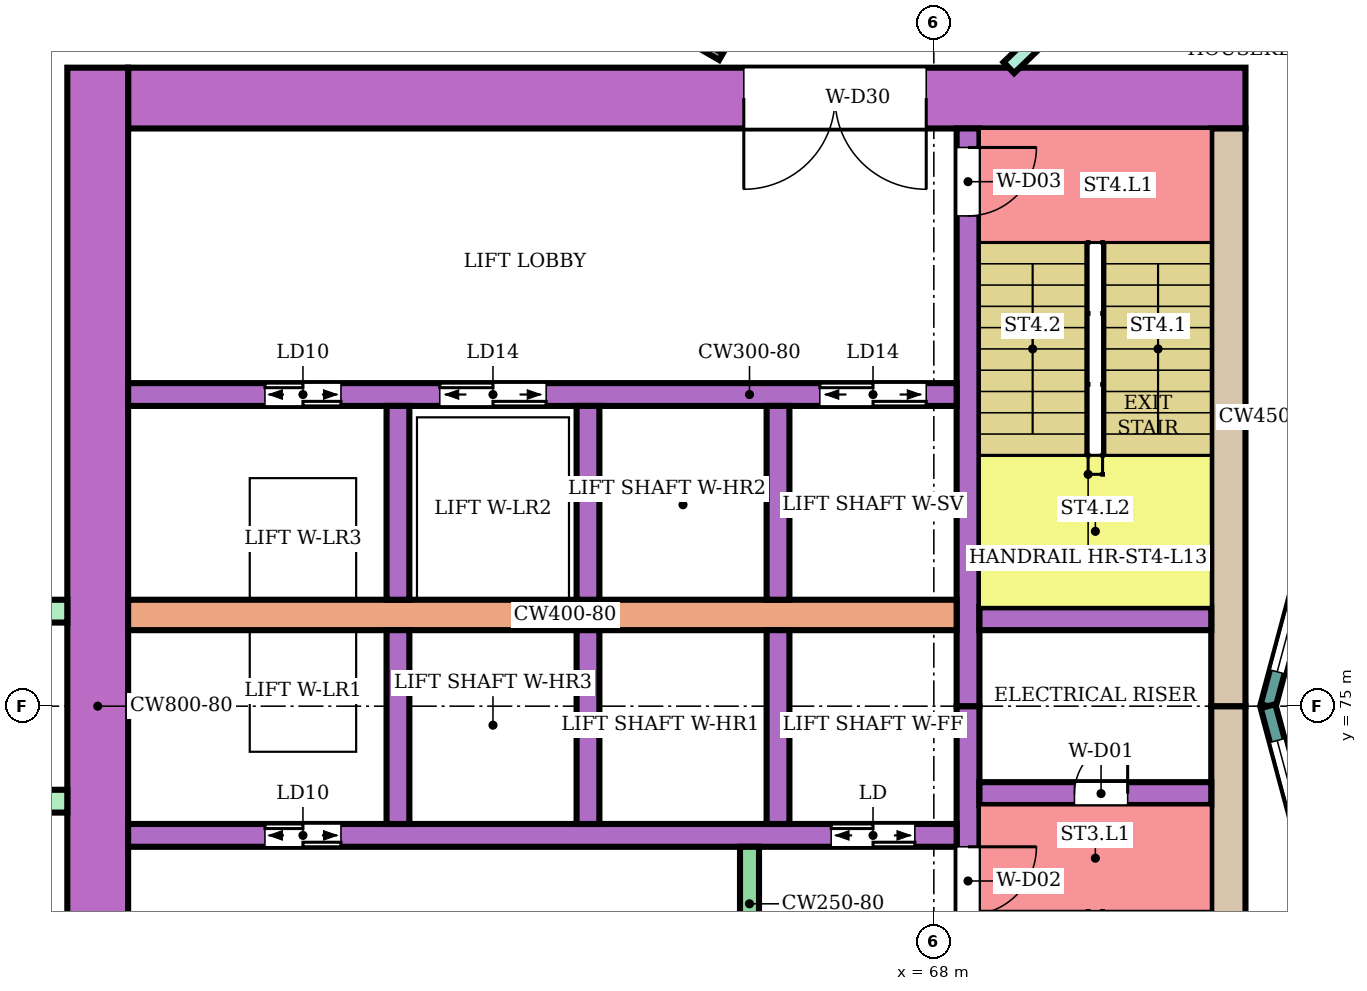
"""IFC4 building model, lengths in metres.
Left out: names, types, materials, properties, quantities, classifications, styles, units other than length and angle.
Written with IfcOpenShell. Run it as: python <this file> out.ifc"""

import sys

from ifc_helpers import new_model, si_unit, direction, frame, frame_2d, origin, place, context, subcontext, project, spatial, rectangle, extrude, element, fill, save


model = new_model("IFC4")
c1 = context("Model", 3, precision=1e-05, world=origin(), true_north=direction((0.0, 1.0)))
c2 = subcontext(c1, "Body", "Model", "MODEL_VIEW")
j1 = project(units=[si_unit("LENGTHUNIT", "METRE"), si_unit("PLANEANGLEUNIT", "RADIAN")], contexts=[c1])
p1 = place(None, origin())
s1 = spatial("IfcSite", under=j1, at=p1, CompositionType="ELEMENT")
p2 = place(p1, origin())
s2 = spatial("IfcBuilding", under=s1, at=p2, CompositionType="ELEMENT")
p3 = place(p2, frame((0.0, 0.0, 59.2)))
s3 = spatial("IfcBuildingStorey", under=s2, at=p3, CompositionType="ELEMENT", Elevation=59.2)
p4 = place(p3, frame((72.1, 83.0, 0.0), z_axis=(0.0, 0.0, 1.0), x_axis=(-1.0, 0.0, 0.0)))
e1 = element("IfcWall", 1, at=p4, inside=s3, PredefinedType="SHEAR", context=c2, shape_type="SweptSolid", body=[
    extrude(rectangle(XDim=14.7, YDim=0.8, at=frame_2d((7.35, 0.0))), origin(), (0.0, 0.0, 1.0), 3.48),
])
p5 = place(p4, frame((4.2, 0.0, 0.0)))
e2 = element("IfcOpeningElement", 2, at=p5, cuts=e1, PredefinedType="OPENING", context=c2, shape_type="SweptSolid", body=[
    extrude(rectangle(XDim=2.4, YDim=2.4, at=frame_2d((1.2, 1.2))), frame((0.0, 0.41, 0.0), z_axis=(0.0, -1.0, 0.0), x_axis=(1.0, 0.0, 0.0)), (0.0, 0.0, 1.0), 0.82),
])
for number, where, z_axis, x_axis in (
    (3, (71.875, 75.0, 0.0), (0.0, 0.0, 1.0), (0.0, -1.0, 0.0)),
    (4, (71.875, 82.6, 0.0), (0.0, 0.0, 1.0), (0.0, -1.0, 0.0)),
):
    element("IfcWall", number, at=place(p3, frame(where, z_axis=z_axis, x_axis=x_axis)), inside=s3, PredefinedType="SHEAR", context=c2, shape_type="SweptSolid", body=[
        extrude(rectangle(XDim=7.6, YDim=0.45, at=frame_2d((3.8, 0.0))), origin(), (0.0, 0.0, 1.0), 3.48),
    ])
p6 = place(p3, frame((57.0, 83.4, 0.0), z_axis=(0.0, 0.0, 1.0), x_axis=(0.0, -1.0, 0.0)))
e5 = element("IfcWall", 5, at=p6, inside=s3, PredefinedType="SHEAR", context=c2, shape_type="SweptSolid", body=[
    extrude(rectangle(XDim=16.8, YDim=0.8, at=frame_2d((8.4, 0.0))), origin(), (0.0, 0.0, 1.0), 3.48),
])
p7 = place(p3, frame((68.45, 75.0, 0.0), z_axis=(0.0, 0.0, 1.0), x_axis=(0.0, -1.0, 0.0)))
e6 = element("IfcWall", 6, at=p7, inside=s3, PredefinedType="SHEAR", context=c2, shape_type="SweptSolid", body=[
    extrude(rectangle(XDim=7.6, YDim=0.3, at=frame_2d((3.8, 0.0))), origin(), (0.0, 0.0, 1.0), 3.48),
])
p8 = place(p7, frame((1.85, 0.0, 0.0)))
e7 = element("IfcOpeningElement", 7, at=p8, cuts=e6, PredefinedType="OPENING", context=c2, shape_type="SweptSolid", body=[
    extrude(rectangle(XDim=0.9, YDim=2.1, at=frame_2d((0.45, 1.05))), frame((0.0, 0.16, 0.0), z_axis=(0.0, -1.0, 0.0), x_axis=(1.0, 0.0, 0.0)), (0.0, 0.0, 1.0), 0.32),
])
p9 = place(p3, frame((68.45, 82.6, 0.0), z_axis=(0.0, 0.0, 1.0), x_axis=(0.0, -1.0, 0.0)))
e8 = element("IfcWall", 8, at=p9, inside=s3, PredefinedType="SHEAR", context=c2, shape_type="SweptSolid", body=[
    extrude(rectangle(XDim=7.6, YDim=0.3, at=frame_2d((3.8, 0.0))), origin(), (0.0, 0.0, 1.0), 3.48),
])
p10 = place(p9, frame((0.25, 0.0, 0.0)))
e9 = element("IfcOpeningElement", 9, at=p10, cuts=e8, PredefinedType="OPENING", context=c2, shape_type="SweptSolid", body=[
    extrude(rectangle(XDim=0.9, YDim=2.1, at=frame_2d((0.45, 1.05))), frame((0.0, 0.16, 0.0), z_axis=(0.0, -1.0, 0.0), x_axis=(1.0, 0.0, 0.0)), (0.0, 0.0, 1.0), 0.32),
])
p11 = place(p3, frame((71.65, 73.85, 0.0), z_axis=(0.0, 0.0, 1.0), x_axis=(-1.0, 0.0, 0.0)))
e10 = element("IfcWall", 10, at=p11, inside=s3, PredefinedType="SHEAR", context=c2, shape_type="SweptSolid", body=[
    extrude(rectangle(XDim=3.05, YDim=0.3, at=frame_2d((1.525, 0.0))), origin(), (0.0, 0.0, 1.0), 3.48),
])
p12 = place(p11, frame((1.1, 0.0, 0.0)))
e11 = element("IfcOpeningElement", 11, at=p12, cuts=e10, PredefinedType="OPENING", context=c2, shape_type="SweptSolid", body=[
    extrude(rectangle(XDim=0.7, YDim=2.0, at=frame_2d((0.35, 1.0))), frame((0.0, 0.16, 0.0), z_axis=(0.0, -1.0, 0.0), x_axis=(1.0, 0.0, 0.0)), (0.0, 0.0, 1.0), 0.32),
])
p13 = place(p3, frame((71.65, 76.15, 0.0), z_axis=(0.0, 0.0, 1.0), x_axis=(-1.0, 0.0, 0.0)))
e12 = element("IfcWall", 12, at=p13, inside=s3, PredefinedType="SHEAR", context=c2, shape_type="SweptSolid", body=[
    extrude(rectangle(XDim=3.05, YDim=0.3, at=frame_2d((1.525, 0.0))), origin(), (0.0, 0.0, 1.0), 3.48),
])
p14 = place(p3, frame((68.3, 73.3, 0.0), z_axis=(0.0, 0.0, 1.0), x_axis=(-1.0, 0.0, 0.0)))
e13 = element("IfcWall", 13, at=p14, inside=s3, PredefinedType="SHEAR", context=c2, shape_type="SweptSolid", body=[
    extrude(rectangle(XDim=10.9, YDim=0.3, at=frame_2d((5.45, 0.0))), origin(), (0.0, 0.0, 1.0), 3.48),
])
p15 = place(p14, frame((0.55, 0.0, 0.0)))
e14 = element("IfcOpeningElement", 14, at=p15, cuts=e13, PredefinedType="OPENING", context=c2, shape_type="SweptSolid", body=[
    extrude(rectangle(XDim=1.1, YDim=2.1, at=frame_2d((0.55, 1.05))), frame((0.0, 0.16, 0.0), z_axis=(0.0, -1.0, 0.0), x_axis=(1.0, 0.0, 0.0)), (0.0, 0.0, 1.0), 0.32),
])
p16 = place(p14, frame((8.1, 0.0, 0.0)))
e15 = element("IfcOpeningElement", 15, at=p16, cuts=e13, PredefinedType="OPENING", context=c2, shape_type="SweptSolid", body=[
    extrude(rectangle(XDim=1.0, YDim=2.1, at=frame_2d((0.5, 1.05))), frame((0.0, 0.16, 0.0), z_axis=(0.0, -1.0, 0.0), x_axis=(1.0, 0.0, 0.0)), (0.0, 0.0, 1.0), 0.32),
])
p17 = place(p3, frame((68.3, 76.2, 0.0), z_axis=(0.0, 0.0, 1.0), x_axis=(-1.0, 0.0, 0.0)))
e16 = element("IfcWall", 16, at=p17, inside=s3, PredefinedType="SHEAR", context=c2, shape_type="SweptSolid", body=[
    extrude(rectangle(XDim=10.9, YDim=0.4, at=frame_2d((5.45, 0.0))), origin(), (0.0, 0.0, 1.0), 3.48),
])
p18 = place(p3, frame((68.3, 79.1, 0.0), z_axis=(0.0, 0.0, 1.0), x_axis=(-1.0, 0.0, 0.0)))
e17 = element("IfcWall", 17, at=p18, inside=s3, PredefinedType="SHEAR", context=c2, shape_type="SweptSolid", body=[
    extrude(rectangle(XDim=10.9, YDim=0.3, at=frame_2d((5.45, 0.0))), origin(), (0.0, 0.0, 1.0), 3.48),
])
p19 = place(p18, frame((0.4, 0.0, 0.0)))
e18 = element("IfcOpeningElement", 18, at=p19, cuts=e17, PredefinedType="OPENING", context=c2, shape_type="SweptSolid", body=[
    extrude(rectangle(XDim=1.4, YDim=2.1, at=frame_2d((0.7, 1.05))), frame((0.0, 0.16, 0.0), z_axis=(0.0, -1.0, 0.0), x_axis=(1.0, 0.0, 0.0)), (0.0, 0.0, 1.0), 0.32),
])
p20 = place(p18, frame((5.4, 0.0, 0.0)))
e19 = element("IfcOpeningElement", 19, at=p20, cuts=e17, PredefinedType="OPENING", context=c2, shape_type="SweptSolid", body=[
    extrude(rectangle(XDim=1.4, YDim=2.1, at=frame_2d((0.7, 1.05))), frame((0.0, 0.16, 0.0), z_axis=(0.0, -1.0, 0.0), x_axis=(1.0, 0.0, 0.0)), (0.0, 0.0, 1.0), 0.32),
])
p21 = place(p18, frame((8.1, 0.0, 0.0)))
e20 = element("IfcOpeningElement", 20, at=p21, cuts=e17, PredefinedType="OPENING", context=c2, shape_type="SweptSolid", body=[
    extrude(rectangle(XDim=1.0, YDim=2.1, at=frame_2d((0.5, 1.05))), frame((0.0, 0.16, 0.0), z_axis=(0.0, -1.0, 0.0), x_axis=(1.0, 0.0, 0.0)), (0.0, 0.0, 1.0), 0.32),
])
for number, where, z_axis, x_axis in (
    (21, (65.95, 76.0, 0.0), (0.0, 0.0, 1.0), (0.0, -1.0, 0.0)),
    (22, (63.45, 76.0, 0.0), (0.0, 0.0, 1.0), (0.0, -1.0, 0.0)),
    (23, (60.95, 76.0, 0.0), (0.0, 0.0, 1.0), (0.0, -1.0, 0.0)),
    (24, (65.95, 78.95, 0.0), (0.0, 0.0, 1.0), (0.0, -1.0, 0.0)),
    (25, (63.45, 78.95, 0.0), (0.0, 0.0, 1.0), (0.0, -1.0, 0.0)),
    (26, (60.95, 78.95, 0.0), (0.0, 0.0, 1.0), (0.0, -1.0, 0.0)),
):
    element("IfcWall", number, at=place(p3, frame(where, z_axis=z_axis, x_axis=x_axis)), inside=s3, PredefinedType="SHEAR", context=c2, shape_type="SweptSolid", body=[
        extrude(rectangle(XDim=2.55, YDim=0.3, at=frame_2d((1.275, 0.0))), origin(), (0.0, 0.0, 1.0), 3.48),
    ])
p22 = place(p3, frame((65.575, 73.15, 0.0), z_axis=(0.0, 0.0, 1.0), x_axis=(0.0, -1.0, 0.0)))
e27 = element("IfcWall", 27, at=p22, inside=s3, PredefinedType="SHEAR", context=c2, shape_type="SweptSolid", body=[
    extrude(rectangle(XDim=1.5, YDim=0.25, at=frame_2d((0.75, 0.0))), origin(), (0.0, 0.0, 1.0), 3.48),
])
for number, where, z_axis, x_axis in (
    (28, (56.6, 76.25, 0.0), (0.0, 0.0, 1.0), (-1.0, 0.0, 0.0)),
    (29, (56.6, 73.75, 0.0), (0.0, 0.0, 1.0), (-1.0, 0.0, 0.0)),
):
    element("IfcWall", number, at=place(p3, frame(where, z_axis=z_axis, x_axis=x_axis)), inside=s3, PredefinedType="NOTDEFINED", context=c2, shape_type="SweptSolid", body=[
        extrude(rectangle(XDim=2.416, YDim=0.3, at=frame_2d((1.208, 0.0))), origin(), (0.0, 0.0, 1.0), 3.8),
    ])
p23 = place(p3, frame((73.415, 78.802, 0.0), z_axis=(0.0, 0.0, 1.0), x_axis=(-0.258789828301, -0.965933654434, 0.0)))
e30 = element("IfcWall", 30, at=p23, inside=s3, PredefinedType="NOTDEFINED", context=c2, shape_type="SweptSolid", body=[
    extrude(rectangle(XDim=3.936, YDim=0.2, at=frame_2d((1.968, 0.0))), origin(), (0.0, 0.0, 1.0), 3.8),
])
p24 = place(p23, frame((0.468, 0.0, 0.9)))
e31 = element("IfcOpeningElement", 31, at=p24, cuts=e30, PredefinedType="OPENING", context=c2, shape_type="SweptSolid", body=[
    extrude(rectangle(XDim=3.0, YDim=2.3, at=frame_2d((1.5, 1.15))), frame((0.0, 0.11, 0.0), z_axis=(0.0, -1.0, 0.0), x_axis=(1.0, 0.0, 0.0)), (0.0, 0.0, 1.0), 0.22),
])
p25 = place(p3, frame((72.396, 75.0, 0.0), z_axis=(0.0, 0.0, 1.0), x_axis=(0.258789828301, -0.965933654434, 0.0)))
e32 = element("IfcWall", 32, at=p25, inside=s3, PredefinedType="NOTDEFINED", context=c2, shape_type="SweptSolid", body=[
    extrude(rectangle(XDim=3.936, YDim=0.2, at=frame_2d((1.968, 0.0))), origin(), (0.0, 0.0, 1.0), 3.8),
])
p26 = place(p25, frame((0.468, 0.0, 0.9)))
e33 = element("IfcOpeningElement", 33, at=p26, cuts=e32, PredefinedType="OPENING", context=c2, shape_type="SweptSolid", body=[
    extrude(rectangle(XDim=3.0, YDim=2.3, at=frame_2d((1.5, 1.15))), frame((0.0, 0.11, 0.0), z_axis=(0.0, -1.0, 0.0), x_axis=(1.0, 0.0, 0.0)), (0.0, 0.0, 1.0), 0.22),
])
p27 = place(p3, frame((68.987, 83.4, 0.0), z_axis=(0.0, 0.0, 1.0), x_axis=(0.719547721855, 0.694442996922, 0.0)))
e34 = element("IfcWall", 34, at=p27, inside=s3, PredefinedType="PARTITIONING", context=c2, shape_type="SweptSolid", body=[
    extrude(rectangle(XDim=5.378, YDim=0.2, at=frame_2d((2.689, 0.0))), origin(), (0.0, 0.0, 1.0), 3.35),
])
p28 = place(p27, frame((2.294, 0.0, 0.0)))
e35 = element("IfcOpeningElement", 35, at=p28, cuts=e34, PredefinedType="OPENING", context=c2, shape_type="SweptSolid", body=[
    extrude(rectangle(XDim=0.9, YDim=2.1, at=frame_2d((0.45, 1.05))), frame((0.0, 0.11, 0.0), z_axis=(0.0, -1.0, 0.0), x_axis=(1.0, 0.0, 0.0)), (0.0, 0.0, 1.0), 0.22),
])
p29 = place(p3, frame((57.659, 87.899, 0.0), z_axis=(0.0, 0.0, 1.0), x_axis=(0.86602264145, -0.500004784474, 0.0)))
e36 = element("IfcWall", 36, at=p29, inside=s3, PredefinedType="PARTITIONING", context=c2, shape_type="SweptSolid", body=[
    extrude(rectangle(XDim=8.708, YDim=0.1, at=frame_2d((4.354, 0.0))), origin(), (0.0, 0.0, 1.0), 3.35),
])
p30 = place(p29, frame((3.929, 0.0, 0.0)))
e37 = element("IfcOpeningElement", 37, at=p30, cuts=e36, PredefinedType="OPENING", context=c2, shape_type="SweptSolid", body=[
    extrude(rectangle(XDim=0.9, YDim=2.1, at=frame_2d((0.45, 1.05))), frame((0.0, 0.06, 0.0), z_axis=(0.0, -1.0, 0.0), x_axis=(1.0, 0.0, 0.0)), (0.0, 0.0, 1.0), 0.12),
])
p31 = place(p24, origin())
e38 = element("IfcWindow", 38, at=p31, inside=s3, PartitioningType="SINGLE_PANEL", PredefinedType="WINDOW", context=c2, shape_type="SweptSolid", body=[
    extrude(rectangle(XDim=3.0, YDim=2.3, at=frame_2d((1.5, 1.15))), frame((0.0, 0.03, 0.0), z_axis=(0.0, -1.0, 0.0), x_axis=(1.0, 0.0, 0.0)), (0.0, 0.0, 1.0), 0.06),
])
fill(e31, e38)
p32 = place(p26, origin())
e39 = element("IfcWindow", 39, at=p32, inside=s3, PartitioningType="SINGLE_PANEL", PredefinedType="WINDOW", context=c2, shape_type="SweptSolid", body=[
    extrude(rectangle(XDim=3.0, YDim=2.3, at=frame_2d((1.5, 1.15))), frame((0.0, 0.03, 0.0), z_axis=(0.0, -1.0, 0.0), x_axis=(1.0, 0.0, 0.0)), (0.0, 0.0, 1.0), 0.06),
])
fill(e33, e39)
p33 = place(p12, frame((0.7, 0.0, 0.0), z_axis=(0.0, 0.0, 1.0), x_axis=(-1.0, 0.0, 0.0)))
e40 = element("IfcDoor", 40, at=p33, inside=s3, OperationType="SINGLE_SWING_RIGHT", PredefinedType="DOOR", context=c2, shape_type="SweptSolid", body=[
    extrude(rectangle(XDim=0.7, YDim=2.0, at=frame_2d((0.35, 1.0))), frame((0.0, 0.025, 0.0), z_axis=(0.0, -1.0, 0.0), x_axis=(1.0, 0.0, 0.0)), (0.0, 0.0, 1.0), 0.05),
])
fill(e11, e40)
p34 = place(p8, origin())
e41 = element("IfcDoor", 41, at=p34, inside=s3, OperationType="SINGLE_SWING_LEFT", PredefinedType="DOOR", context=c2, shape_type="SweptSolid", body=[
    extrude(rectangle(XDim=0.9, YDim=2.1, at=frame_2d((0.45, 1.05))), frame((0.0, 0.025, 0.0), z_axis=(0.0, -1.0, 0.0), x_axis=(1.0, 0.0, 0.0)), (0.0, 0.0, 1.0), 0.05),
])
fill(e7, e41)
p35 = place(p10, origin())
e42 = element("IfcDoor", 42, at=p35, inside=s3, OperationType="SINGLE_SWING_LEFT", PredefinedType="DOOR", context=c2, shape_type="SweptSolid", body=[
    extrude(rectangle(XDim=0.9, YDim=2.1, at=frame_2d((0.45, 1.05))), frame((0.0, 0.025, 0.0), z_axis=(0.0, -1.0, 0.0), x_axis=(1.0, 0.0, 0.0)), (0.0, 0.0, 1.0), 0.05),
])
fill(e9, e42)
p36 = place(p15, origin())
e43 = element("IfcDoor", 43, at=p36, inside=s3, OperationType="DOUBLE_DOOR_SLIDING", PredefinedType="DOOR", context=c2, shape_type="SweptSolid", body=[
    extrude(rectangle(XDim=1.1, YDim=2.1, at=frame_2d((0.55, 1.05))), frame((0.0, 0.025, 0.0), z_axis=(0.0, -1.0, 0.0), x_axis=(1.0, 0.0, 0.0)), (0.0, 0.0, 1.0), 0.05),
])
fill(e14, e43)
p37 = place(p16, origin())
e44 = element("IfcDoor", 44, at=p37, inside=s3, OperationType="DOUBLE_DOOR_SLIDING", PredefinedType="DOOR", context=c2, shape_type="SweptSolid", body=[
    extrude(rectangle(XDim=1.0, YDim=2.1, at=frame_2d((0.5, 1.05))), frame((0.0, 0.025, 0.0), z_axis=(0.0, -1.0, 0.0), x_axis=(1.0, 0.0, 0.0)), (0.0, 0.0, 1.0), 0.05),
])
fill(e15, e44)
p38 = place(p19, origin())
e45 = element("IfcDoor", 45, at=p38, inside=s3, OperationType="DOUBLE_DOOR_SLIDING", PredefinedType="DOOR", context=c2, shape_type="SweptSolid", body=[
    extrude(rectangle(XDim=1.4, YDim=2.1, at=frame_2d((0.7, 1.05))), frame((0.0, 0.025, 0.0), z_axis=(0.0, -1.0, 0.0), x_axis=(1.0, 0.0, 0.0)), (0.0, 0.0, 1.0), 0.05),
])
fill(e18, e45)
p39 = place(p20, origin())
e46 = element("IfcDoor", 46, at=p39, inside=s3, OperationType="DOUBLE_DOOR_SLIDING", PredefinedType="DOOR", context=c2, shape_type="SweptSolid", body=[
    extrude(rectangle(XDim=1.4, YDim=2.1, at=frame_2d((0.7, 1.05))), frame((0.0, 0.025, 0.0), z_axis=(0.0, -1.0, 0.0), x_axis=(1.0, 0.0, 0.0)), (0.0, 0.0, 1.0), 0.05),
])
fill(e19, e46)
p40 = place(p21, origin())
e47 = element("IfcDoor", 47, at=p40, inside=s3, OperationType="DOUBLE_DOOR_SLIDING", PredefinedType="DOOR", context=c2, shape_type="SweptSolid", body=[
    extrude(rectangle(XDim=1.0, YDim=2.1, at=frame_2d((0.5, 1.05))), frame((0.0, 0.025, 0.0), z_axis=(0.0, -1.0, 0.0), x_axis=(1.0, 0.0, 0.0)), (0.0, 0.0, 1.0), 0.05),
])
fill(e20, e47)
p41 = place(p5, origin())
e48 = element("IfcDoor", 48, at=p41, inside=s3, OperationType="DOUBLE_DOOR_SINGLE_SWING", PredefinedType="DOOR", context=c2, shape_type="SweptSolid", body=[
    extrude(rectangle(XDim=2.4, YDim=2.4, at=frame_2d((1.2, 1.2))), frame((0.0, 0.025, 0.0), z_axis=(0.0, -1.0, 0.0), x_axis=(1.0, 0.0, 0.0)), (0.0, 0.0, 1.0), 0.05),
])
fill(e2, e48)
save(model, sys.argv[1])
